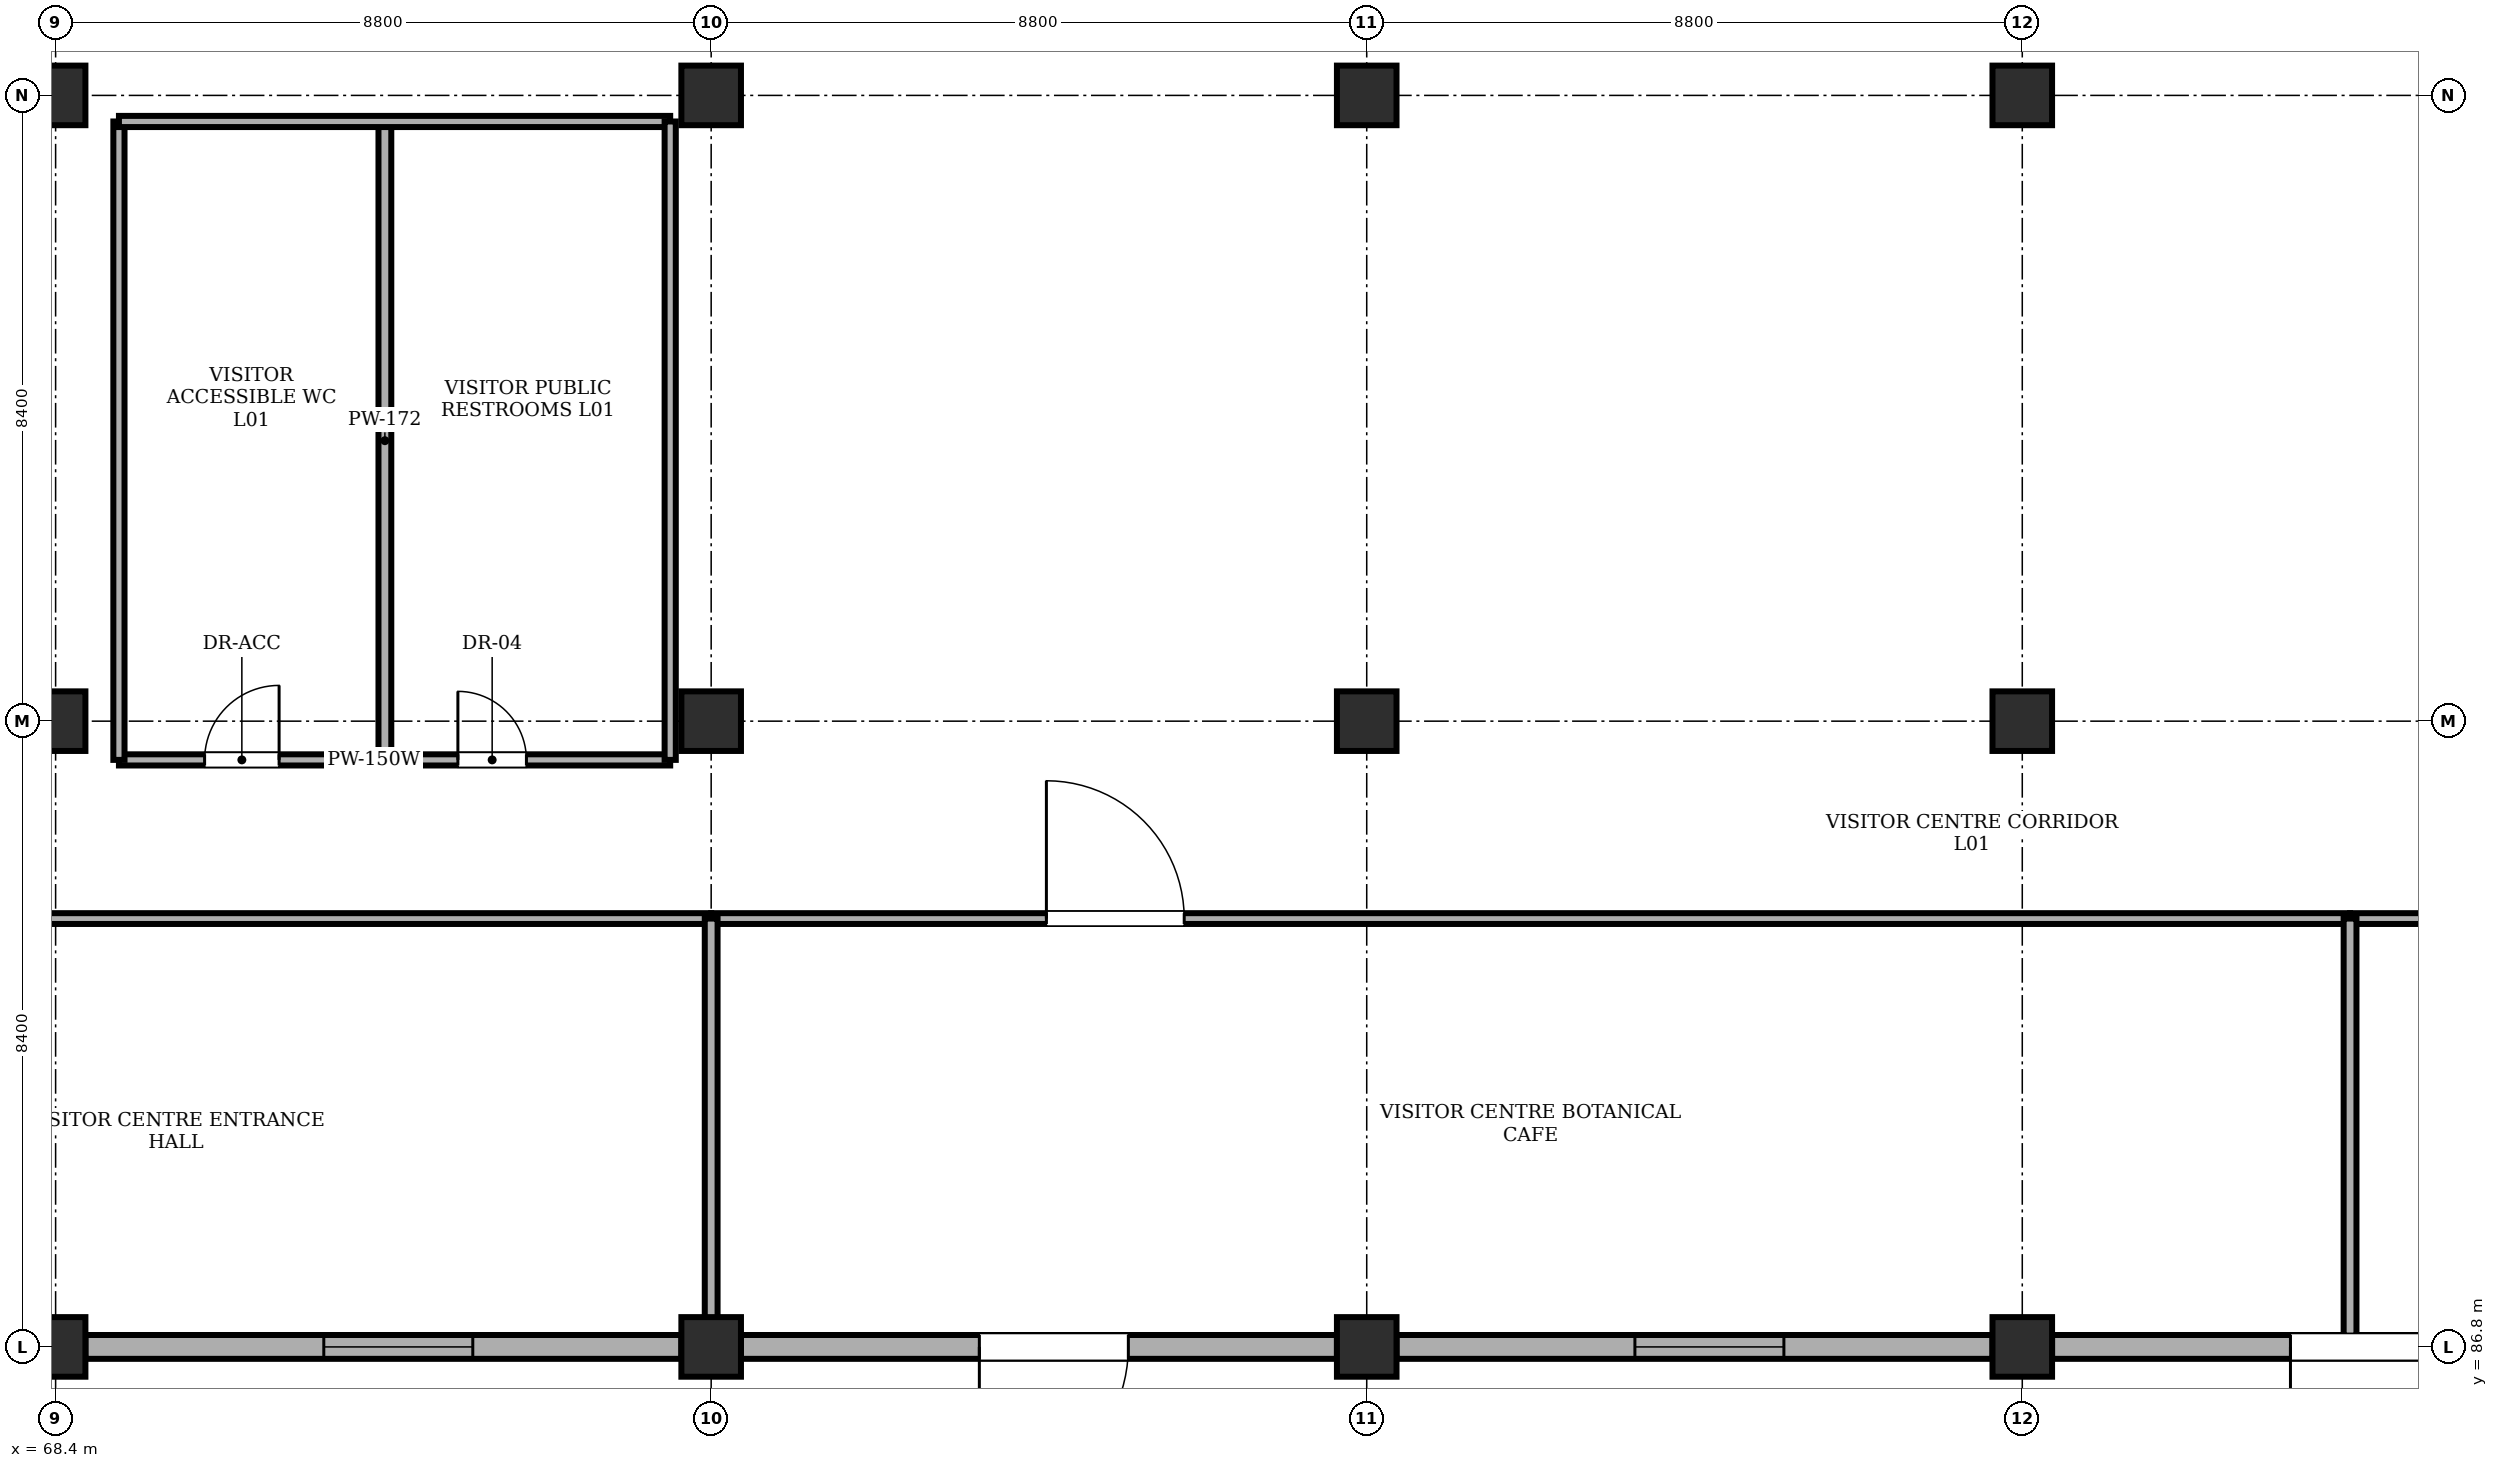
"""IFC4 building model, lengths in metres.
Left out: names, types, materials, properties, quantities, classifications, styles, units other than length and angle.
Written with IfcOpenShell. Run it as: python <this file> out.ifc"""

import sys

from ifc_helpers import new_model, si_unit, direction, frame, frame_2d, origin, origin_2d, place, context, subcontext, project, spatial, rectangle, extrude, element, fill, save


model = new_model("IFC4")
c1 = context("Model", 3, precision=1e-05, world=origin(), true_north=direction((0.0, 1.0)))
c2 = subcontext(c1, "Body", "Model", "MODEL_VIEW")
j1 = project(units=[si_unit("LENGTHUNIT", "METRE"), si_unit("PLANEANGLEUNIT", "RADIAN")], contexts=[c1])
p1 = place(None, origin())
s1 = spatial("IfcSite", under=j1, at=p1, CompositionType="ELEMENT")
p2 = place(p1, origin())
s2 = spatial("IfcBuilding", under=s1, at=p2, CompositionType="ELEMENT")
p3 = place(p2, origin())
s3 = spatial("IfcBuildingStorey", under=s2, at=p3, CompositionType="ELEMENT", Elevation=0.0)
for number, where, z_axis, x_axis in (
    (1, (68.4, 86.8, 0.0), (0.0, 0.0, 1.0), (1.0, 0.0, 0.0)),
    (2, (68.4, 95.2, 0.0), (0.0, 0.0, 1.0), (1.0, 0.0, 0.0)),
    (3, (68.4, 103.6, 0.0), (0.0, 0.0, 1.0), (1.0, 0.0, 0.0)),
    (4, (77.2, 86.8, 0.0), (0.0, 0.0, 1.0), (1.0, 0.0, 0.0)),
    (5, (77.2, 95.2, 0.0), (0.0, 0.0, 1.0), (1.0, 0.0, 0.0)),
    (6, (77.2, 103.6, 0.0), (0.0, 0.0, 1.0), (1.0, 0.0, 0.0)),
    (7, (86.0, 86.8, 0.0), (0.0, 0.0, 1.0), (1.0, 0.0, 0.0)),
    (8, (86.0, 95.2, 0.0), (0.0, 0.0, 1.0), (1.0, 0.0, 0.0)),
    (9, (86.0, 103.6, 0.0), (0.0, 0.0, 1.0), (1.0, 0.0, 0.0)),
    (10, (94.8, 86.8, 0.0), (0.0, 0.0, 1.0), (1.0, 0.0, 0.0)),
    (11, (94.8, 95.2, 0.0), (0.0, 0.0, 1.0), (1.0, 0.0, 0.0)),
    (12, (94.8, 103.6, 0.0), (0.0, 0.0, 1.0), (1.0, 0.0, 0.0)),
):
    element("IfcColumn", number, at=place(p3, frame(where, z_axis=z_axis, x_axis=x_axis)), inside=s3, PredefinedType="COLUMN", context=c2, shape_type="SweptSolid", body=[
        extrude(rectangle(XDim=0.8, YDim=0.8, at=origin_2d()), origin(), (0.0, 0.0, 1.0), 5.18),
    ])
p4 = place(p3, frame((76.8, 86.8, 0.0), z_axis=(0.0, 0.0, 1.0), x_axis=(-1.0, 0.0, 0.0)))
e13 = element("IfcWall", 13, at=p4, inside=s3, PredefinedType="STANDARD", context=c2, shape_type="SweptSolid", body=[
    extrude(rectangle(XDim=8.0, YDim=0.32, at=frame_2d((4.0, 0.0))), origin(), (0.0, 0.0, 1.0), 4.53),
])
p5 = place(p4, frame((2.8, 0.0, 0.95)))
e14 = element("IfcOpeningElement", 14, at=p5, cuts=e13, PredefinedType="OPENING", context=c2, shape_type="SweptSolid", body=[
    extrude(rectangle(XDim=2.0, YDim=2.2, at=frame_2d((1.0, 1.1))), frame((0.0, 0.17, 0.0), z_axis=(0.0, -1.0, 0.0), x_axis=(1.0, 0.0, 0.0)), (0.0, 0.0, 1.0), 0.34),
])
p6 = place(p3, frame((85.6, 86.8, 0.0), z_axis=(0.0, 0.0, 1.0), x_axis=(-1.0, 0.0, 0.0)))
e15 = element("IfcWall", 15, at=p6, inside=s3, PredefinedType="STANDARD", context=c2, shape_type="SweptSolid", body=[
    extrude(rectangle(XDim=8.0, YDim=0.32, at=frame_2d((4.0, 0.0))), origin(), (0.0, 0.0, 1.0), 4.53),
])
p7 = place(p6, frame((2.8, 0.0, 0.0)))
e16 = element("IfcOpeningElement", 16, at=p7, cuts=e15, PredefinedType="OPENING", context=c2, shape_type="SweptSolid", body=[
    extrude(rectangle(XDim=2.0, YDim=2.4, at=frame_2d((1.0, 1.2))), frame((0.0, 0.17, 0.0), z_axis=(0.0, -1.0, 0.0), x_axis=(1.0, 0.0, 0.0)), (0.0, 0.0, 1.0), 0.34),
])
p8 = place(p3, frame((94.4, 86.8, 0.0), z_axis=(0.0, 0.0, 1.0), x_axis=(-1.0, 0.0, 0.0)))
e17 = element("IfcWall", 17, at=p8, inside=s3, PredefinedType="STANDARD", context=c2, shape_type="SweptSolid", body=[
    extrude(rectangle(XDim=8.0, YDim=0.32, at=frame_2d((4.0, 0.0))), origin(), (0.0, 0.0, 1.0), 4.53),
])
p9 = place(p8, frame((2.8, 0.0, 0.95)))
e18 = element("IfcOpeningElement", 18, at=p9, cuts=e17, PredefinedType="OPENING", context=c2, shape_type="SweptSolid", body=[
    extrude(rectangle(XDim=2.0, YDim=2.2, at=frame_2d((1.0, 1.1))), frame((0.0, 0.17, 0.0), z_axis=(0.0, -1.0, 0.0), x_axis=(1.0, 0.0, 0.0)), (0.0, 0.0, 1.0), 0.34),
])
p10 = place(p3, frame((103.2, 86.8, 0.0), z_axis=(0.0, 0.0, 1.0), x_axis=(-1.0, 0.0, 0.0)))
e19 = element("IfcWall", 19, at=p10, inside=s3, PredefinedType="STANDARD", context=c2, shape_type="SweptSolid", body=[
    extrude(rectangle(XDim=8.0, YDim=0.32, at=frame_2d((4.0, 0.0))), origin(), (0.0, 0.0, 1.0), 4.53),
])
p11 = place(p10, frame((2.8, 0.0, 0.0)))
e20 = element("IfcOpeningElement", 20, at=p11, cuts=e19, PredefinedType="OPENING", context=c2, shape_type="SweptSolid", body=[
    extrude(rectangle(XDim=2.0, YDim=2.4, at=frame_2d((1.0, 1.2))), frame((0.0, 0.17, 0.0), z_axis=(0.0, -1.0, 0.0), x_axis=(1.0, 0.0, 0.0)), (0.0, 0.0, 1.0), 0.34),
])
p12 = place(p3, frame((69.25, 94.68, 0.0), z_axis=(0.0, 0.0, 1.0), x_axis=(1.0, 0.0, 0.0)))
e21 = element("IfcWall", 21, at=p12, inside=s3, PredefinedType="PARTITIONING", context=c2, shape_type="SweptSolid", body=[
    extrude(rectangle(XDim=7.4, YDim=0.15, at=frame_2d((3.7, 0.0))), origin(), (0.0, 0.0, 1.0), 5.18),
])
p13 = place(p12, frame((1.15, 0.0, 0.0)))
e22 = element("IfcOpeningElement", 22, at=p13, cuts=e21, PredefinedType="OPENING", context=c2, shape_type="SweptSolid", body=[
    extrude(rectangle(XDim=1.0, YDim=2.12, at=frame_2d((0.5, 1.06))), frame((0.0, 0.085, 0.0), z_axis=(0.0, -1.0, 0.0), x_axis=(1.0, 0.0, 0.0)), (0.0, 0.0, 1.0), 0.17),
])
p14 = place(p12, frame((4.55, 0.0, 0.0)))
e23 = element("IfcOpeningElement", 23, at=p14, cuts=e21, PredefinedType="OPENING", context=c2, shape_type="SweptSolid", body=[
    extrude(rectangle(XDim=0.92, YDim=2.1, at=frame_2d((0.46, 1.05))), frame((0.0, 0.085, 0.0), z_axis=(0.0, -1.0, 0.0), x_axis=(1.0, 0.0, 0.0)), (0.0, 0.0, 1.0), 0.17),
])
p15 = place(p3, frame((69.25, 94.68, 0.0), z_axis=(0.0, 0.0, 1.0), x_axis=(0.0, 1.0, 0.0)))
e24 = element("IfcWall", 24, at=p15, inside=s3, PredefinedType="PARTITIONING", context=c2, shape_type="SweptSolid", body=[
    extrude(rectangle(XDim=8.57, YDim=0.15, at=frame_2d((4.285, 0.0))), origin(), (0.0, 0.0, 1.0), 5.18),
])
p16 = place(p3, frame((72.82, 94.68, 0.0), z_axis=(0.0, 0.0, 1.0), x_axis=(0.0, 1.0, 0.0)))
e25 = element("IfcWall", 25, at=p16, inside=s3, PredefinedType="PARTITIONING", context=c2, shape_type="SweptSolid", body=[
    extrude(rectangle(XDim=8.57, YDim=0.172, at=frame_2d((4.285, 0.0))), origin(), (0.0, 0.0, 1.0), 4.73),
])
p17 = place(p3, frame((69.25, 103.25, 0.0), z_axis=(0.0, 0.0, 1.0), x_axis=(1.0, 0.0, 0.0)))
e26 = element("IfcWall", 26, at=p17, inside=s3, PredefinedType="PARTITIONING", context=c2, shape_type="SweptSolid", body=[
    extrude(rectangle(XDim=7.4, YDim=0.15, at=frame_2d((3.7, 0.0))), origin(), (0.0, 0.0, 1.0), 5.18),
])
p18 = place(p3, frame((76.65, 94.68, 0.0), z_axis=(0.0, 0.0, 1.0), x_axis=(0.0, 1.0, 0.0)))
e27 = element("IfcWall", 27, at=p18, inside=s3, PredefinedType="PARTITIONING", context=c2, shape_type="SweptSolid", body=[
    extrude(rectangle(XDim=8.57, YDim=0.15, at=frame_2d((4.285, 0.0))), origin(), (0.0, 0.0, 1.0), 5.18),
])
p19 = place(p3, frame((50.92, 92.55, 0.0), z_axis=(0.0, 0.0, 1.0), x_axis=(1.0, 0.0, 0.0)))
e28 = element("IfcWall", 28, at=p19, inside=s3, PredefinedType="PARTITIONING", context=c2, shape_type="SweptSolid", body=[
    extrude(rectangle(XDim=26.28, YDim=0.145, at=frame_2d((13.14, 0.0))), origin(), (0.0, 0.0, 1.0), 5.18),
])
p20 = place(p19, frame((4.5, 0.0, 0.0)))
e29 = element("IfcOpeningElement", 29, at=p20, cuts=e28, PredefinedType="OPENING", context=c2, shape_type="SweptSolid", body=[
    extrude(rectangle(XDim=1.85, YDim=2.25, at=frame_2d((0.925, 1.125))), frame((0.0, 0.083, 0.0), z_axis=(0.0, -1.0, 0.0), x_axis=(1.0, 0.0, 0.0)), (0.0, 0.0, 1.0), 0.165),
])
p21 = place(p3, frame((77.2, 92.55, 0.0), z_axis=(0.0, 0.0, 1.0), x_axis=(1.0, 0.0, 0.0)))
e30 = element("IfcWall", 30, at=p21, inside=s3, PredefinedType="PARTITIONING", context=c2, shape_type="SweptSolid", body=[
    extrude(rectangle(XDim=22.0, YDim=0.145, at=frame_2d((11.0, 0.0))), origin(), (0.0, 0.0, 1.0), 5.18),
])
p22 = place(p21, frame((4.5, 0.0, 0.0)))
e31 = element("IfcOpeningElement", 31, at=p22, cuts=e30, PredefinedType="OPENING", context=c2, shape_type="SweptSolid", body=[
    extrude(rectangle(XDim=1.85, YDim=2.25, at=frame_2d((0.925, 1.125))), frame((0.0, 0.083, 0.0), z_axis=(0.0, -1.0, 0.0), x_axis=(1.0, 0.0, 0.0)), (0.0, 0.0, 1.0), 0.165),
])
p23 = place(p3, frame((77.2, 86.95, 0.0), z_axis=(0.0, 0.0, 1.0), x_axis=(0.0, 1.0, 0.0)))
e32 = element("IfcWall", 32, at=p23, inside=s3, PredefinedType="PARTITIONING", context=c2, shape_type="SweptSolid", body=[
    extrude(rectangle(XDim=5.6, YDim=0.172, at=frame_2d((2.8, 0.0))), origin(), (0.0, 0.0, 1.0), 4.53),
])
p24 = place(p3, frame((99.2, 92.55, 0.0), z_axis=(0.0, 0.0, 1.0), x_axis=(1.0, 0.0, 0.0)))
e33 = element("IfcWall", 33, at=p24, inside=s3, PredefinedType="PARTITIONING", context=c2, shape_type="SweptSolid", body=[
    extrude(rectangle(XDim=21.82, YDim=0.145, at=frame_2d((10.91, 0.0))), origin(), (0.0, 0.0, 1.0), 5.18),
])
p25 = place(p24, frame((4.5, 0.0, 0.0)))
e34 = element("IfcOpeningElement", 34, at=p25, cuts=e33, PredefinedType="OPENING", context=c2, shape_type="SweptSolid", body=[
    extrude(rectangle(XDim=1.08, YDim=2.15, at=frame_2d((0.54, 1.075))), frame((0.0, 0.083, 0.0), z_axis=(0.0, -1.0, 0.0), x_axis=(1.0, 0.0, 0.0)), (0.0, 0.0, 1.0), 0.165),
])
p26 = place(p3, frame((99.2, 86.95, 0.0), z_axis=(0.0, 0.0, 1.0), x_axis=(0.0, 1.0, 0.0)))
e35 = element("IfcWall", 35, at=p26, inside=s3, PredefinedType="PARTITIONING", context=c2, shape_type="SweptSolid", body=[
    extrude(rectangle(XDim=5.6, YDim=0.172, at=frame_2d((2.8, 0.0))), origin(), (0.0, 0.0, 1.0), 4.73),
])
p27 = place(p5, origin())
e36 = element("IfcWindow", 36, at=p27, inside=s3, PartitioningType="DOUBLE_PANEL_VERTICAL", PredefinedType="WINDOW", context=c2, shape_type="SweptSolid", body=[
    extrude(rectangle(XDim=2.0, YDim=2.2, at=frame_2d((1.0, 1.1))), frame((0.0, 0.03, 0.0), z_axis=(0.0, -1.0, 0.0), x_axis=(1.0, 0.0, 0.0)), (0.0, 0.0, 1.0), 0.06),
])
fill(e14, e36)
p28 = place(p7, origin())
e37 = element("IfcDoor", 37, at=p28, inside=s3, OperationType="SINGLE_SWING_RIGHT", PredefinedType="DOOR", context=c2, shape_type="SweptSolid", body=[
    extrude(rectangle(XDim=2.0, YDim=2.4, at=frame_2d((1.0, 1.2))), frame((0.0, 0.025, 0.0), z_axis=(0.0, -1.0, 0.0), x_axis=(1.0, 0.0, 0.0)), (0.0, 0.0, 1.0), 0.05),
])
fill(e16, e37)
p29 = place(p9, origin())
e38 = element("IfcWindow", 38, at=p29, inside=s3, PartitioningType="DOUBLE_PANEL_VERTICAL", PredefinedType="WINDOW", context=c2, shape_type="SweptSolid", body=[
    extrude(rectangle(XDim=2.0, YDim=2.2, at=frame_2d((1.0, 1.1))), frame((0.0, 0.03, 0.0), z_axis=(0.0, -1.0, 0.0), x_axis=(1.0, 0.0, 0.0)), (0.0, 0.0, 1.0), 0.06),
])
fill(e18, e38)
p30 = place(p11, origin())
e39 = element("IfcDoor", 39, at=p30, inside=s3, OperationType="SINGLE_SWING_RIGHT", PredefinedType="DOOR", context=c2, shape_type="SweptSolid", body=[
    extrude(rectangle(XDim=2.0, YDim=2.4, at=frame_2d((1.0, 1.2))), frame((0.0, 0.025, 0.0), z_axis=(0.0, -1.0, 0.0), x_axis=(1.0, 0.0, 0.0)), (0.0, 0.0, 1.0), 0.05),
])
fill(e20, e39)
p31 = place(p13, origin())
e40 = element("IfcDoor", 40, at=p31, inside=s3, OperationType="SINGLE_SWING_RIGHT", PredefinedType="DOOR", context=c2, shape_type="SweptSolid", body=[
    extrude(rectangle(XDim=1.0, YDim=2.12, at=frame_2d((0.5, 1.06))), frame((0.0, 0.025, 0.0), z_axis=(0.0, -1.0, 0.0), x_axis=(1.0, 0.0, 0.0)), (0.0, 0.0, 1.0), 0.05),
])
fill(e22, e40)
p32 = place(p14, origin())
e41 = element("IfcDoor", 41, at=p32, inside=s3, OperationType="SINGLE_SWING_LEFT", PredefinedType="DOOR", context=c2, shape_type="SweptSolid", body=[
    extrude(rectangle(XDim=0.92, YDim=2.1, at=frame_2d((0.46, 1.05))), frame((0.0, 0.025, 0.0), z_axis=(0.0, -1.0, 0.0), x_axis=(1.0, 0.0, 0.0)), (0.0, 0.0, 1.0), 0.05),
])
fill(e23, e41)
p33 = place(p22, origin())
e42 = element("IfcDoor", 42, at=p33, inside=s3, OperationType="SINGLE_SWING_LEFT", PredefinedType="DOOR", context=c2, shape_type="SweptSolid", body=[
    extrude(rectangle(XDim=1.85, YDim=2.25, at=frame_2d((0.925, 1.125))), frame((0.0, 0.025, 0.0), z_axis=(0.0, -1.0, 0.0), x_axis=(1.0, 0.0, 0.0)), (0.0, 0.0, 1.0), 0.05),
])
fill(e31, e42)
save(model, sys.argv[1])
